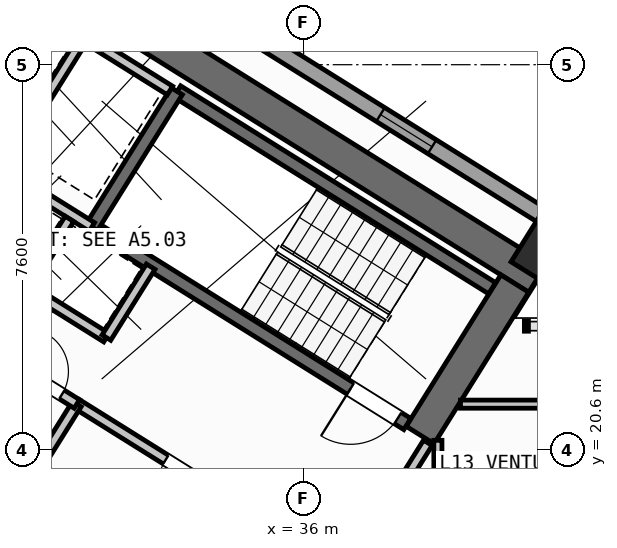
"""IFC4 building model, lengths in metres.
Left out: names, types, materials, properties, quantities, classifications, styles, units other than length and angle.
Written with IfcOpenShell. Run it as: python <this file> out.ifc"""

import sys

from ifc_helpers import new_model, si_unit, direction, frame, frame_2d, origin, origin_2d, place, context, subcontext, project, spatial, rectangle, hollow_rectangle, extrude, source, transform, mapped, element, fill, save


model = new_model("IFC4")
c1 = context("Model", 3, precision=1e-05, world=origin(), true_north=direction((0.0, 1.0)))
c2 = subcontext(c1, "Body", "Model", "MODEL_VIEW")
j1 = project(units=[si_unit("LENGTHUNIT", "METRE"), si_unit("PLANEANGLEUNIT", "RADIAN")], contexts=[c1])
p1 = place(None, origin())
s1 = spatial("IfcSite", under=j1, at=p1, CompositionType="ELEMENT")
p2 = place(p1, origin())
s2 = spatial("IfcBuilding", under=s1, at=p2, CompositionType="ELEMENT")
p3 = place(p2, frame((0.0, 0.0, 52.8)))
s3 = spatial("IfcBuildingStorey", under=s2, at=p3, CompositionType="ELEMENT", Elevation=52.8)
p4 = place(p3, frame((40.615, 23.983, 0.0), z_axis=(0.0, 0.0, 1.0), x_axis=(-0.848045953968, 0.529922692436, 0.0)))
e1 = element("IfcWall", 1, at=p4, inside=s3, PredefinedType="SHEAR", context=c2, shape_type="SweptSolid", body=[
    extrude(rectangle(XDim=13.24, YDim=0.65, at=frame_2d((6.62, 0.0))), origin(), (0.0, 0.0, 1.0), 3.35),
])
p5 = place(p3, frame((40.168, 23.88, 0.0), z_axis=(0.0, 0.0, 1.0), x_axis=(-0.529893103397, -0.8480644427, 0.0)))
e2 = element("IfcWall", 2, at=p5, inside=s3, PredefinedType="SHEAR", context=c2, shape_type="SweptSolid", body=[
    extrude(rectangle(XDim=3.525, YDim=0.65, at=frame_2d((1.763, 0.0))), origin(), (0.0, 0.0, 1.0), 3.35),
])
m1 = source(origin(), c2, "Body", "SweptSolid", [
    extrude(hollow_rectangle(XDim=1.0, YDim=1.0, WallThickness=0.04, at=origin_2d()), origin(), (0.0, 0.0, 1.0), 3.6),
])
p6 = place(p3, frame((40.783, 24.469, 0.0), z_axis=(0.0, 0.0, 1.0), x_axis=(-0.848048096156, 0.529919264233, 0.0)))
e3 = element("IfcColumn", 3, at=p6, inside=s3, PredefinedType="COLUMN", context=c2, shape_type="MappedRepresentation", body=[
    mapped(m1, transform((0.0, 0.0, 0.0), scale=1.0)),
])
p7 = place(p3, frame((14.138, 41.825, 0.0), z_axis=(0.0, 0.0, 1.0), x_axis=(0.848046498049, -0.529921821731, 0.0)))
e4 = element("IfcWall", 4, at=p7, inside=s3, PredefinedType="STANDARD", context=c2, shape_type="SweptSolid", body=[
    extrude(rectangle(XDim=31.588, YDim=0.32, at=frame_2d((15.794, 0.0))), origin(), (0.0, 0.0, 1.0), 3.35),
])
p8 = place(p7, frame((3.159, 0.0, 0.0)))
e5 = element("IfcOpeningElement", 5, at=p8, cuts=e4, PredefinedType="OPENING", context=c2, shape_type="SweptSolid", body=[
    extrude(rectangle(XDim=1.05, YDim=2.15, at=frame_2d((0.525, 1.075))), frame((0.0, 0.17, 0.0), z_axis=(0.0, -1.0, 0.0), x_axis=(1.0, 0.0, 0.0)), (0.0, 0.0, 1.0), 0.34),
])
p9 = place(p7, frame((0.906, 0.0, 1.0)))
e6 = element("IfcOpeningElement", 6, at=p9, cuts=e4, PredefinedType="OPENING", context=c2, shape_type="SweptSolid", body=[
    extrude(rectangle(XDim=0.9, YDim=1.25, at=frame_2d((0.45, 0.625))), frame((0.0, 0.17, 0.0), z_axis=(0.0, -1.0, 0.0), x_axis=(1.0, 0.0, 0.0)), (0.0, 0.0, 1.0), 0.34),
])
p10 = place(p7, frame((9.537, 0.0, 0.85)))
e7 = element("IfcOpeningElement", 7, at=p10, cuts=e4, PredefinedType="OPENING", context=c2, shape_type="SweptSolid", body=[
    extrude(rectangle(XDim=1.8, YDim=1.5, at=frame_2d((0.9, 0.75))), frame((0.0, 0.17, 0.0), z_axis=(0.0, -1.0, 0.0), x_axis=(1.0, 0.0, 0.0)), (0.0, 0.0, 1.0), 0.34),
])
p11 = place(p7, frame((13.899, 0.0, 0.85)))
e8 = element("IfcOpeningElement", 8, at=p11, cuts=e4, PredefinedType="OPENING", context=c2, shape_type="SweptSolid", body=[
    extrude(rectangle(XDim=1.5, YDim=1.5, at=frame_2d((0.75, 0.75))), frame((0.0, 0.17, 0.0), z_axis=(0.0, -1.0, 0.0), x_axis=(1.0, 0.0, 0.0)), (0.0, 0.0, 1.0), 0.34),
])
p12 = place(p7, frame((22.019, 0.0, 0.95)))
e9 = element("IfcOpeningElement", 9, at=p12, cuts=e4, PredefinedType="OPENING", context=c2, shape_type="SweptSolid", body=[
    extrude(rectangle(XDim=1.2, YDim=1.4, at=frame_2d((0.6, 0.7))), frame((0.0, 0.17, 0.0), z_axis=(0.0, -1.0, 0.0), x_axis=(1.0, 0.0, 0.0)), (0.0, 0.0, 1.0), 0.34),
])
p13 = place(p7, frame((27.569, 0.0, 0.95)))
e10 = element("IfcOpeningElement", 10, at=p13, cuts=e4, PredefinedType="OPENING", context=c2, shape_type="SweptSolid", body=[
    extrude(rectangle(XDim=1.2, YDim=1.4, at=frame_2d((0.6, 0.7))), frame((0.0, 0.17, 0.0), z_axis=(0.0, -1.0, 0.0), x_axis=(1.0, 0.0, 0.0)), (0.0, 0.0, 1.0), 0.34),
])
p14 = place(p3, frame((31.28, 18.261, 0.0), z_axis=(0.0, 0.0, 1.0), x_axis=(-0.848051618787, 0.529913626805, 0.0)))
e11 = element("IfcWall", 11, at=p14, inside=s3, PredefinedType="SHEAR", context=c2, shape_type="SweptSolid", body=[
    extrude(rectangle(XDim=7.46, YDim=0.26, at=frame_2d((3.73, 0.0))), origin(), (0.0, 0.0, 1.0), 3.35),
])
p15 = place(p14, frame((0.36, 0.0, 0.0)))
e12 = element("IfcOpeningElement", 12, at=p15, cuts=e11, PredefinedType="OPENING", context=c2, shape_type="SweptSolid", body=[
    extrude(rectangle(XDim=0.86, YDim=2.05, at=frame_2d((0.43, 1.025))), frame((0.0, 0.14, 0.0), z_axis=(0.0, -1.0, 0.0), x_axis=(1.0, 0.0, 0.0)), (0.0, 0.0, 1.0), 0.28),
])
p16 = place(p3, frame((39.721, 23.788, 0.0), z_axis=(0.0, 0.0, 1.0), x_axis=(-0.848054434086, 0.529909121291, 0.0)))
e13 = element("IfcWall", 13, at=p16, inside=s3, PredefinedType="SHEAR", context=c2, shape_type="SweptSolid", body=[
    extrude(rectangle(XDim=7.33, YDim=0.26, at=frame_2d((3.665, 0.0))), origin(), (0.0, 0.0, 1.0), 3.35),
])
p17 = place(p3, frame((38.046, 21.108, 0.0), z_axis=(0.0, 0.0, 1.0), x_axis=(-0.848054434086, 0.529909121291, 0.0)))
e14 = element("IfcWall", 14, at=p17, inside=s3, PredefinedType="SHEAR", context=c2, shape_type="SweptSolid", body=[
    extrude(rectangle(XDim=7.33, YDim=0.26, at=frame_2d((3.665, 0.0))), origin(), (0.0, 0.0, 1.0), 3.35),
])
p18 = place(p17, frame((0.22, 0.0, 0.0)))
e15 = element("IfcOpeningElement", 15, at=p18, cuts=e14, PredefinedType="OPENING", context=c2, shape_type="SweptSolid", body=[
    extrude(rectangle(XDim=1.1, YDim=2.1, at=frame_2d((0.55, 1.05))), frame((0.0, 0.14, 0.0), z_axis=(0.0, -1.0, 0.0), x_axis=(1.0, 0.0, 0.0)), (0.0, 0.0, 1.0), 0.28),
])
p19 = place(p3, frame((33.496, 27.677, 0.0), z_axis=(0.0, 0.0, 1.0), x_axis=(-0.529908658664, -0.84805472316, 0.0)))
e16 = element("IfcWall", 16, at=p19, inside=s3, PredefinedType="SHEAR", context=c2, shape_type="SweptSolid", body=[
    extrude(rectangle(XDim=3.16, YDim=0.26, at=frame_2d((1.58, 0.0))), origin(), (0.0, 0.0, 1.0), 3.35),
])
p20 = place(p3, frame((36.374, 18.474, 0.0), z_axis=(0.0, 0.0, 1.0), x_axis=(-0.848051071577, 0.529914502535, 0.0)))
e17 = element("IfcWall", 17, at=p20, inside=s3, PredefinedType="STANDARD", context=c2, shape_type="SweptSolid", body=[
    extrude(rectangle(XDim=5.718, YDim=0.2, at=frame_2d((2.859, 0.0))), origin(), (0.0, 0.0, 1.0), 3.34),
])
p21 = place(p20, frame((2.498, 0.0, 0.0)))
e18 = element("IfcOpeningElement", 18, at=p21, cuts=e17, PredefinedType="OPENING", context=c2, shape_type="SweptSolid", body=[
    extrude(rectangle(XDim=1.15, YDim=2.1, at=frame_2d((0.575, 1.05))), frame((0.0, 0.11, 0.0), z_axis=(0.0, -1.0, 0.0), x_axis=(1.0, 0.0, 0.0)), (0.0, 0.0, 1.0), 0.22),
])
p22 = place(p3, frame((31.822, 24.998, 0.0), z_axis=(0.0, 0.0, 1.0), x_axis=(-0.848058348634, 0.529902856485, 0.0)))
e19 = element("IfcWall", 19, at=p22, inside=s3, PredefinedType="STANDARD", context=c2, shape_type="SweptSolid", body=[
    extrude(rectangle(XDim=4.568, YDim=0.2, at=frame_2d((2.284, 0.0))), origin(), (0.0, 0.0, 1.0), 3.34),
])
p23 = place(p3, frame((32.108, 22.814, 0.0), z_axis=(0.0, 0.0, 1.0), x_axis=(-0.848042229521, 0.529928652696, 0.0)))
e20 = element("IfcWall", 20, at=p23, inside=s3, PredefinedType="STANDARD", context=c2, shape_type="SweptSolid", body=[
    extrude(rectangle(XDim=5.62, YDim=0.2, at=frame_2d((2.81, 0.0))), origin(), (0.0, 0.0, 1.0), 3.34),
])
p24 = place(p3, frame((32.982, 24.213, 0.0), z_axis=(0.0, 0.0, 1.0), x_axis=(-0.529839334948, -0.84809803628, 0.0)))
e21 = element("IfcWall", 21, at=p24, inside=s3, PredefinedType="STANDARD", context=c2, shape_type="SweptSolid", body=[
    extrude(rectangle(XDim=1.65, YDim=0.2, at=frame_2d((0.825, 0.0))), origin(), (0.0, 0.0, 1.0), 3.34),
])
p25 = place(p3, frame((31.645, 28.716, 0.0), z_axis=(0.0, 0.0, 1.0), x_axis=(-0.52986693015, -0.848080795876, 0.0)))
e22 = element("IfcWall", 22, at=p25, inside=s3, PredefinedType="STANDARD", context=c2, shape_type="SweptSolid", body=[
    extrude(rectangle(XDim=2.66, YDim=0.2, at=frame_2d((1.33, 0.0))), origin(), (0.0, 0.0, 1.0), 3.34),
])
p26 = place(p3, frame((33.363, 27.69, 0.0), z_axis=(0.0, 0.0, 1.0), x_axis=(-0.848053806312, 0.529910125964, 0.0)))
e23 = element("IfcWall", 23, at=p26, inside=s3, PredefinedType="STANDARD", context=c2, shape_type="SweptSolid", body=[
    extrude(rectangle(XDim=4.448, YDim=0.2, at=frame_2d((2.224, 0.0))), origin(), (0.0, 0.0, 1.0), 3.34),
])
p27 = place(p3, frame((31.379, 25.156, 0.0), z_axis=(0.0, 0.0, 1.0), x_axis=(-0.529998940003, -0.847998304005, 0.0)))
e24 = element("IfcWall", 24, at=p27, inside=s3, PredefinedType="STANDARD", context=c2, shape_type="SweptSolid", body=[
    extrude(rectangle(XDim=1.58, YDim=0.2, at=frame_2d((0.79, 0.0))), origin(), (0.0, 0.0, 1.0), 3.34),
])
p28 = place(p3, frame((31.525, 21.504, 0.0), z_axis=(0.0, 0.0, 1.0), x_axis=(-0.529907497854, -0.848055448493, 0.0)))
e25 = element("IfcWall", 25, at=p28, inside=s3, PredefinedType="STANDARD", context=c2, shape_type="SweptSolid", body=[
    extrude(rectangle(XDim=2.88, YDim=0.2, at=frame_2d((1.44, 0.0))), origin(), (0.0, 0.0, 1.0), 3.34),
])
p29 = place(p3, frame((31.525, 21.504, 0.0), z_axis=(0.0, 0.0, 1.0), x_axis=(-0.848044998614, 0.529924221305, 0.0)))
e26 = element("IfcWall", 26, at=p29, inside=s3, PredefinedType="STANDARD", context=c2, shape_type="SweptSolid", body=[
    extrude(rectangle(XDim=6.168, YDim=0.2, at=frame_2d((3.084, 0.0))), origin(), (0.0, 0.0, 1.0), 3.34),
])
p30 = place(p29, frame((4.4, 0.0, 0.0)))
e27 = element("IfcOpeningElement", 27, at=p30, cuts=e26, PredefinedType="OPENING", context=c2, shape_type="SweptSolid", body=[
    extrude(rectangle(XDim=0.86, YDim=2.05, at=frame_2d((0.43, 1.025))), frame((0.0, 0.11, 0.0), z_axis=(0.0, -1.0, 0.0), x_axis=(1.0, 0.0, 0.0)), (0.0, 0.0, 1.0), 0.22),
])
p31 = place(p29, frame((0.35, 0.0, 0.0)))
e28 = element("IfcOpeningElement", 28, at=p31, cuts=e26, PredefinedType="OPENING", context=c2, shape_type="SweptSolid", body=[
    extrude(rectangle(XDim=0.86, YDim=2.05, at=frame_2d((0.43, 1.025))), frame((0.0, 0.11, 0.0), z_axis=(0.0, -1.0, 0.0), x_axis=(1.0, 0.0, 0.0)), (0.0, 0.0, 1.0), 0.22),
])
p32 = place(p3, frame((38.451, 20.737, 0.0), z_axis=(0.0, 0.0, 1.0), x_axis=(-0.529924799939, -0.848044637038, 0.0)))
e29 = element("IfcWall", 29, at=p32, inside=s3, PredefinedType="STANDARD", context=c2, shape_type="SweptSolid", body=[
    extrude(rectangle(XDim=2.96, YDim=0.2, at=frame_2d((1.48, 0.0))), origin(), (0.0, 0.0, 1.0), 3.34),
])
p33 = place(p32, frame((1.46, 0.0, 0.0)))
e30 = element("IfcOpeningElement", 30, at=p33, cuts=e29, PredefinedType="OPENING", context=c2, shape_type="SweptSolid", body=[
    extrude(rectangle(XDim=0.86, YDim=2.05, at=frame_2d((0.43, 1.025))), frame((0.0, 0.11, 0.0), z_axis=(0.0, -1.0, 0.0), x_axis=(1.0, 0.0, 0.0)), (0.0, 0.0, 1.0), 0.22),
])
p34 = place(p3, frame((38.65, 17.93, 0.0), z_axis=(0.0, 0.0, 1.0), x_axis=(0.0, 1.0, 0.0)))
e31 = element("IfcWall", 31, at=p34, inside=s3, PredefinedType="PARTITIONING", context=c2, shape_type="SweptSolid", body=[
    extrude(rectangle(XDim=2.857, YDim=0.16, at=frame_2d((1.428, 0.0))), origin(), (0.0, 0.0, 1.0), 3.34),
])
p35 = place(p3, frame((39.095, 21.5, 0.0), z_axis=(0.0, 0.0, 1.0), x_axis=(1.0, 0.0, 0.0)))
e32 = element("IfcWall", 32, at=p35, inside=s3, PredefinedType="PARTITIONING", context=c2, shape_type="SweptSolid", body=[
    extrude(rectangle(XDim=7.094, YDim=0.16, at=frame_2d((3.547, 0.0))), origin(), (0.0, 0.0, 1.0), 3.34),
])
m2 = source(origin(), c2, "Body", "SweptSolid", [
    extrude(rectangle(XDim=1.2, YDim=1.4, at=frame_2d((0.6, 0.7))), frame((0.0, 0.03, 0.0), z_axis=(0.0, -1.0, 0.0), x_axis=(1.0, 0.0, 0.0)), (0.0, 0.0, 1.0), 0.06),
])
p36 = place(p13, origin())
e33 = element("IfcWindow", 33, at=p36, inside=s3, PartitioningType="SINGLE_PANEL", PredefinedType="WINDOW", context=c2, shape_type="MappedRepresentation", body=[
    mapped(m2, transform((0.0, 0.0, 0.0), scale=1.0)),
])
fill(e10, e33)
m3 = source(origin(), c2, "Body", "SweptSolid", [
    extrude(rectangle(XDim=1.1, YDim=2.1, at=frame_2d((0.55, 1.05))), frame((0.0, 0.025, 0.0), z_axis=(0.0, -1.0, 0.0), x_axis=(1.0, 0.0, 0.0)), (0.0, 0.0, 1.0), 0.05),
])
p37 = place(p18, origin())
e34 = element("IfcDoor", 34, at=p37, inside=s3, OperationType="SINGLE_SWING_RIGHT", PredefinedType="DOOR", context=c2, shape_type="MappedRepresentation", body=[
    mapped(m3, transform((0.0, 0.0, 0.0), scale=1.0)),
])
fill(e15, e34)
m4 = source(origin(), c2, "Body", "SweptSolid", [
    extrude(rectangle(XDim=1.15, YDim=2.1, at=frame_2d((0.575, 1.05))), frame((0.0, 0.025, 0.0), z_axis=(0.0, -1.0, 0.0), x_axis=(1.0, 0.0, 0.0)), (0.0, 0.0, 1.0), 0.05),
])
p38 = place(p21, origin())
e35 = element("IfcDoor", 35, at=p38, inside=s3, OperationType="SINGLE_SWING_LEFT", PredefinedType="DOOR", context=c2, shape_type="MappedRepresentation", body=[
    mapped(m4, transform((0.0, 0.0, 0.0), scale=1.0)),
])
fill(e18, e35)
m5 = source(origin(), c2, "Body", "SweptSolid", [
    extrude(rectangle(XDim=0.86, YDim=2.05, at=frame_2d((0.43, 1.025))), frame((0.0, 0.025, 0.0), z_axis=(0.0, -1.0, 0.0), x_axis=(1.0, 0.0, 0.0)), (0.0, 0.0, 1.0), 0.05),
])
p39 = place(p31, frame((0.86, 0.0, 0.0), z_axis=(0.0, 0.0, 1.0), x_axis=(-1.0, 0.0, 0.0)))
e36 = element("IfcDoor", 36, at=p39, inside=s3, OperationType="SINGLE_SWING_LEFT", PredefinedType="DOOR", context=c2, shape_type="MappedRepresentation", body=[
    mapped(m5, transform((0.0, 0.0, 0.0), scale=1.0)),
])
fill(e28, e36)
save(model, sys.argv[1])
